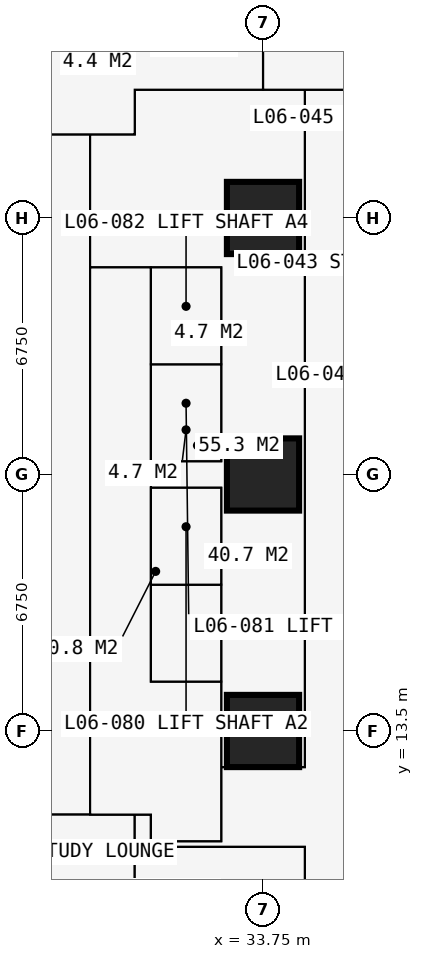
"""IFC4 building model, lengths in metres.
Left out: names, types, materials, properties, quantities, classifications, styles, units other than length and angle.
Written with IfcOpenShell. Run it as: python <this file> out.ifc"""

import sys

from ifc_helpers import new_model, si_unit, direction, frame, frame_2d, origin, origin_2d, place, context, subcontext, project, spatial, rectangle, extrude, element, fill, save


model = new_model("IFC4")
c1 = context("Model", 3, precision=1e-05, world=origin(), true_north=direction((0.0, 1.0)))
c2 = subcontext(c1, "Body", "Model", "MODEL_VIEW")
j1 = project(units=[si_unit("LENGTHUNIT", "METRE"), si_unit("PLANEANGLEUNIT", "RADIAN")], contexts=[c1])
p1 = place(None, origin())
s1 = spatial("IfcSite", under=j1, at=p1, CompositionType="ELEMENT")
p2 = place(p1, origin())
s2 = spatial("IfcBuilding", under=s1, at=p2, CompositionType="ELEMENT")
p3 = place(p2, frame((0.0, 0.0, 25.2)))
s3 = spatial("IfcBuildingStorey", under=s2, at=p3, CompositionType="ELEMENT", Elevation=25.2)
for number, where, z_axis, x_axis in (
    (1, (33.75, 13.5, 0.0), (0.0, 0.0, 1.0), (1.0, 0.0, 0.0)),
    (2, (33.75, 20.25, 0.0), (0.0, 0.0, 1.0), (1.0, 0.0, 0.0)),
    (3, (33.75, 27.0, 0.0), (0.0, 0.0, 1.0), (1.0, 0.0, 0.0)),
):
    element("IfcColumn", number, at=place(p3, frame(where, z_axis=z_axis, x_axis=x_axis)), inside=s3, PredefinedType="COLUMN", context=c2, shape_type="SweptSolid", body=[
        extrude(rectangle(XDim=1.9, YDim=1.9, at=origin_2d()), origin(), (0.0, 0.0, 1.0), 3.6),
    ])
p4 = place(p3, frame((10.125, 11.3, 0.0), z_axis=(0.0, 0.0, 1.0), x_axis=(1.0, 0.0, 0.0)))
e4 = element("IfcWall", 4, at=p4, inside=s3, PredefinedType="PARTITIONING", context=c2, shape_type="SweptSolid", body=[
    extrude(rectangle(XDim=20.675, YDim=0.15, at=frame_2d((10.337, 0.0))), origin(), (0.0, 0.0, 1.0), 3.375),
])
p5 = place(p4, frame((1.775, 0.0, 0.0)))
e5 = element("IfcOpeningElement", 5, at=p5, cuts=e4, PredefinedType="OPENING", context=c2, shape_type="SweptSolid", body=[
    extrude(rectangle(XDim=1.0, YDim=2.2, at=frame_2d((0.5, 1.1))), frame((0.0, 0.085, 0.0), z_axis=(0.0, -1.0, 0.0), x_axis=(1.0, 0.0, 0.0)), (0.0, 0.0, 1.0), 0.17),
])
p6 = place(p4, frame((11.312, 0.0, 0.0)))
e6 = element("IfcOpeningElement", 6, at=p6, cuts=e4, PredefinedType="OPENING", context=c2, shape_type="SweptSolid", body=[
    extrude(rectangle(XDim=1.0, YDim=2.2, at=frame_2d((0.5, 1.1))), frame((0.0, 0.085, 0.0), z_axis=(0.0, -1.0, 0.0), x_axis=(1.0, 0.0, 0.0)), (0.0, 0.0, 1.0), 0.17),
])
p7 = place(p3, frame((11.3, 29.2, 0.0), z_axis=(0.0, 0.0, 1.0), x_axis=(1.0, 0.0, 0.0)))
e7 = element("IfcWall", 7, at=p7, inside=s3, PredefinedType="PARTITIONING", context=c2, shape_type="SweptSolid", body=[
    extrude(rectangle(XDim=19.075, YDim=0.15, at=frame_2d((9.538, 0.0))), origin(), (0.0, 0.0, 1.0), 3.375),
])
p8 = place(p7, frame((12.875, 0.0, 0.0)))
e8 = element("IfcOpeningElement", 8, at=p8, cuts=e7, PredefinedType="OPENING", context=c2, shape_type="SweptSolid", body=[
    extrude(rectangle(XDim=1.0, YDim=2.2, at=frame_2d((0.5, 1.1))), frame((0.0, 0.085, 0.0), z_axis=(0.0, -1.0, 0.0), x_axis=(1.0, 0.0, 0.0)), (0.0, 0.0, 1.0), 0.17),
])
p9 = place(p7, frame((10.438, 0.0, 0.0)))
e9 = element("IfcOpeningElement", 9, at=p9, cuts=e7, PredefinedType="OPENING", context=c2, shape_type="SweptSolid", body=[
    extrude(rectangle(XDim=1.0, YDim=2.2, at=frame_2d((0.5, 1.1))), frame((0.0, 0.085, 0.0), z_axis=(0.0, -1.0, 0.0), x_axis=(1.0, 0.0, 0.0)), (0.0, 0.0, 1.0), 0.17),
])
p10 = place(p7, frame((15.675, 0.0, 0.0)))
e10 = element("IfcOpeningElement", 10, at=p10, cuts=e7, PredefinedType="OPENING", context=c2, shape_type="SweptSolid", body=[
    extrude(rectangle(XDim=0.95, YDim=2.2, at=frame_2d((0.475, 1.1))), frame((0.0, 0.085, 0.0), z_axis=(0.0, -1.0, 0.0), x_axis=(1.0, 0.0, 0.0)), (0.0, 0.0, 1.0), 0.17),
])
p11 = place(p3, frame((29.2, 11.3, 0.0), z_axis=(0.0, 0.0, 1.0), x_axis=(0.0, 1.0, 0.0)))
e11 = element("IfcWall", 11, at=p11, inside=s3, PredefinedType="PARTITIONING", context=c2, shape_type="SweptSolid", body=[
    extrude(rectangle(XDim=17.9, YDim=0.2, at=frame_2d((8.95, 0.0))), origin(), (0.0, 0.0, 1.0), 3.375),
])
p12 = place(p11, frame((8.35, 0.0, 0.0)))
e12 = element("IfcOpeningElement", 12, at=p12, cuts=e11, PredefinedType="OPENING", context=c2, shape_type="SweptSolid", body=[
    extrude(rectangle(XDim=1.2, YDim=2.2, at=frame_2d((0.6, 1.1))), frame((0.0, 0.11, 0.0), z_axis=(0.0, -1.0, 0.0), x_axis=(1.0, 0.0, 0.0)), (0.0, 0.0, 1.0), 0.22),
])
p13 = place(p3, frame((29.2, 25.7, 0.0), z_axis=(0.0, 0.0, 1.0), x_axis=(1.0, 0.0, 0.0)))
e13 = element("IfcWall", 13, at=p13, inside=s3, PredefinedType="SHEAR", context=c2, shape_type="SweptSolid", body=[
    extrude(rectangle(XDim=3.45, YDim=0.1, at=frame_2d((1.725, 0.0))), origin(), (0.0, 0.0, 1.0), 3.375),
])
p14 = place(p3, frame((30.375, -0.734, 0.0), z_axis=(0.0, 0.0, 1.0), x_axis=(0.0, 1.0, 0.0)))
e14 = element("IfcWall", 14, at=p14, inside=s3, PredefinedType="PARTITIONING", context=c2, shape_type="SweptSolid", body=[
    extrude(rectangle(XDim=12.034, YDim=0.15, at=frame_2d((6.017, 0.0))), origin(), (0.0, 0.0, 1.0), 3.375),
])
p15 = place(p14, frame((5.134, 0.0, 0.0)))
e15 = element("IfcOpeningElement", 15, at=p15, cuts=e14, PredefinedType="OPENING", context=c2, shape_type="SweptSolid", body=[
    extrude(rectangle(XDim=1.0, YDim=2.2, at=frame_2d((0.5, 1.1))), frame((0.0, 0.085, 0.0), z_axis=(0.0, -1.0, 0.0), x_axis=(1.0, 0.0, 0.0)), (0.0, 0.0, 1.0), 0.17),
])
p16 = place(p3, frame((30.375, 10.45, 0.0), z_axis=(0.0, 0.0, 1.0), x_axis=(1.0, 0.0, 0.0)))
e16 = element("IfcWall", 16, at=p16, inside=s3, PredefinedType="PARTITIONING", context=c2, shape_type="SweptSolid", body=[
    extrude(rectangle(XDim=4.475, YDim=0.15, at=frame_2d((2.238, 0.0))), origin(), (0.0, 0.0, 1.0), 3.375),
])
p17 = place(p16, frame((2.35, 0.0, 0.0)))
e17 = element("IfcOpeningElement", 17, at=p17, cuts=e16, PredefinedType="OPENING", context=c2, shape_type="SweptSolid", body=[
    extrude(rectangle(XDim=0.95, YDim=2.2, at=frame_2d((0.475, 1.1))), frame((0.0, 0.085, 0.0), z_axis=(0.0, -1.0, 0.0), x_axis=(1.0, 0.0, 0.0)), (0.0, 0.0, 1.0), 0.17),
])
p18 = place(p3, frame((30.375, 29.2, 0.0), z_axis=(0.0, 0.0, 1.0), x_axis=(0.0, 1.0, 0.0)))
e18 = element("IfcWall", 18, at=p18, inside=s3, PredefinedType="PARTITIONING", context=c2, shape_type="SweptSolid", body=[
    extrude(rectangle(XDim=1.175, YDim=0.15, at=frame_2d((0.587, 0.0))), origin(), (0.0, 0.0, 1.0), 3.375),
])
p19 = place(p3, frame((30.375, 30.375, 0.0), z_axis=(0.0, 0.0, 1.0), x_axis=(1.0, 0.0, 0.0)))
e19 = element("IfcWall", 19, at=p19, inside=s3, PredefinedType="PARTITIONING", context=c2, shape_type="SweptSolid", body=[
    extrude(rectangle(XDim=10.859, YDim=0.15, at=frame_2d((5.429, 0.0))), origin(), (0.0, 0.0, 1.0), 3.375),
])
p20 = place(p3, frame((30.8, 10.6, 0.0), z_axis=(0.0, 0.0, 1.0), x_axis=(0.0, 1.0, 0.0)))
e20 = element("IfcWall", 20, at=p20, inside=s3, PredefinedType="PARTITIONING", context=c2, shape_type="SweptSolid", body=[
    extrude(rectangle(XDim=0.7, YDim=0.15, at=frame_2d((0.35, 0.0))), origin(), (0.0, 0.0, 1.0), 3.375),
])
p21 = place(p3, frame((30.8, 10.6, 0.0), z_axis=(0.0, 0.0, 1.0), x_axis=(1.0, 0.0, 0.0)))
e21 = element("IfcWall", 21, at=p21, inside=s3, PredefinedType="PARTITIONING", context=c2, shape_type="SweptSolid", body=[
    extrude(rectangle(XDim=1.85, YDim=0.15, at=frame_2d((0.925, 0.0))), origin(), (0.0, 0.0, 1.0), 3.375),
])
p22 = place(p3, frame((30.8, 14.8, 0.0), z_axis=(0.0, 0.0, 1.0), x_axis=(0.0, 1.0, 0.0)))
e22 = element("IfcWall", 22, at=p22, inside=s3, PredefinedType="PARTITIONING", context=c2, shape_type="SweptSolid", body=[
    extrude(rectangle(XDim=10.9, YDim=0.15, at=frame_2d((5.45, 0.0))), origin(), (0.0, 0.0, 1.0), 3.375),
])
p23 = place(p22, frame((0.75, 0.0, 0.0)))
e23 = element("IfcOpeningElement", 23, at=p23, cuts=e22, PredefinedType="OPENING", context=c2, shape_type="SweptSolid", body=[
    extrude(rectangle(XDim=1.1, YDim=2.2, at=frame_2d((0.55, 1.1))), frame((0.0, 0.085, 0.0), z_axis=(0.0, -1.0, 0.0), x_axis=(1.0, 0.0, 0.0)), (0.0, 0.0, 1.0), 0.17),
])
p24 = place(p22, frame((3.25, 0.0, 0.0)))
e24 = element("IfcOpeningElement", 24, at=p24, cuts=e22, PredefinedType="OPENING", context=c2, shape_type="SweptSolid", body=[
    extrude(rectangle(XDim=1.1, YDim=2.2, at=frame_2d((0.55, 1.1))), frame((0.0, 0.085, 0.0), z_axis=(0.0, -1.0, 0.0), x_axis=(1.0, 0.0, 0.0)), (0.0, 0.0, 1.0), 0.17),
])
p25 = place(p22, frame((6.5, 0.0, 0.0)))
e25 = element("IfcOpeningElement", 25, at=p25, cuts=e22, PredefinedType="OPENING", context=c2, shape_type="SweptSolid", body=[
    extrude(rectangle(XDim=1.1, YDim=2.2, at=frame_2d((0.55, 1.1))), frame((0.0, 0.085, 0.0), z_axis=(0.0, -1.0, 0.0), x_axis=(1.0, 0.0, 0.0)), (0.0, 0.0, 1.0), 0.17),
])
p26 = place(p22, frame((9.05, 0.0, 0.0)))
e26 = element("IfcOpeningElement", 26, at=p26, cuts=e22, PredefinedType="OPENING", context=c2, shape_type="SweptSolid", body=[
    extrude(rectangle(XDim=1.1, YDim=2.2, at=frame_2d((0.55, 1.1))), frame((0.0, 0.085, 0.0), z_axis=(0.0, -1.0, 0.0), x_axis=(1.0, 0.0, 0.0)), (0.0, 0.0, 1.0), 0.17),
])
for number, where, z_axis, x_axis in (
    (27, (30.8, 14.8, 0.0), (0.0, 0.0, 1.0), (1.0, 0.0, 0.0)),
    (28, (30.8, 17.35, 0.0), (0.0, 0.0, 1.0), (1.0, 0.0, 0.0)),
    (29, (30.8, 19.9, 0.0), (0.0, 0.0, 1.0), (1.0, 0.0, 0.0)),
    (30, (30.8, 20.6, 0.0), (0.0, 0.0, 1.0), (1.0, 0.0, 0.0)),
    (31, (30.8, 23.15, 0.0), (0.0, 0.0, 1.0), (1.0, 0.0, 0.0)),
):
    element("IfcWall", number, at=place(p3, frame(where, z_axis=z_axis, x_axis=x_axis)), inside=s3, PredefinedType="SHEAR", context=c2, shape_type="SweptSolid", body=[
        extrude(rectangle(XDim=1.85, YDim=0.1, at=frame_2d((0.925, 0.0))), origin(), (0.0, 0.0, 1.0), 3.375),
    ])
p27 = place(p3, frame((32.65, 10.6, 0.0), z_axis=(0.0, 0.0, 1.0), x_axis=(0.0, 1.0, 0.0)))
e32 = element("IfcWall", 32, at=p27, inside=s3, PredefinedType="SHEAR", context=c2, shape_type="SweptSolid", body=[
    extrude(rectangle(XDim=9.3, YDim=0.1, at=frame_2d((4.65, 0.0))), origin(), (0.0, 0.0, 1.0), 3.375),
])
p28 = place(p27, frame((0.5, 0.0, 0.0)))
e33 = element("IfcOpeningElement", 33, at=p28, cuts=e32, PredefinedType="OPENING", context=c2, shape_type="SweptSolid", body=[
    extrude(rectangle(XDim=1.0, YDim=2.2, at=frame_2d((0.5, 1.1))), frame((0.0, 0.06, 0.0), z_axis=(0.0, -1.0, 0.0), x_axis=(1.0, 0.0, 0.0)), (0.0, 0.0, 1.0), 0.12),
])
p29 = place(p3, frame((32.65, 12.55, 0.0), z_axis=(0.0, 0.0, 1.0), x_axis=(1.0, 0.0, 0.0)))
e34 = element("IfcWall", 34, at=p29, inside=s3, PredefinedType="PARTITIONING", context=c2, shape_type="SweptSolid", body=[
    extrude(rectangle(XDim=2.2, YDim=0.15, at=frame_2d((1.1, 0.0))), origin(), (0.0, 0.0, 1.0), 3.375),
])
p30 = place(p3, frame((32.65, 20.6, 0.0), z_axis=(0.0, 0.0, 1.0), x_axis=(0.0, 1.0, 0.0)))
e35 = element("IfcWall", 35, at=p30, inside=s3, PredefinedType="PARTITIONING", context=c2, shape_type="SweptSolid", body=[
    extrude(rectangle(XDim=5.1, YDim=0.15, at=frame_2d((2.55, 0.0))), origin(), (0.0, 0.0, 1.0), 3.375),
])
p31 = place(p3, frame((33.75, 30.375, 0.0), z_axis=(0.0, 0.0, 1.0), x_axis=(0.0, 1.0, 0.0)))
e36 = element("IfcWall", 36, at=p31, inside=s3, PredefinedType="PARTITIONING", context=c2, shape_type="SweptSolid", body=[
    extrude(rectangle(XDim=5.975, YDim=0.15, at=frame_2d((2.988, 0.0))), origin(), (0.0, 0.0, 1.0), 2.877),
])
p32 = place(p3, frame((34.85, 6.75, 0.0), z_axis=(0.0, 0.0, 1.0), x_axis=(0.0, 1.0, 0.0)))
e37 = element("IfcWall", 37, at=p32, inside=s3, PredefinedType="PARTITIONING", context=c2, shape_type="SweptSolid", body=[
    extrude(rectangle(XDim=3.7, YDim=0.15, at=frame_2d((1.85, 0.0))), origin(), (0.0, 0.0, 1.0), 3.375),
])
p33 = place(p3, frame((34.85, 12.55, 0.0), z_axis=(0.0, 0.0, 1.0), x_axis=(0.0, 1.0, 0.0)))
e38 = element("IfcWall", 38, at=p33, inside=s3, PredefinedType="PARTITIONING", context=c2, shape_type="SweptSolid", body=[
    extrude(rectangle(XDim=17.825, YDim=0.15, at=frame_2d((8.913, 0.0))), origin(), (0.0, 0.0, 1.0), 3.375),
])
p34 = place(p33, frame((8.65, 0.0, 0.0)))
e39 = element("IfcOpeningElement", 39, at=p34, cuts=e38, PredefinedType="OPENING", context=c2, shape_type="SweptSolid", body=[
    extrude(rectangle(XDim=0.95, YDim=2.2, at=frame_2d((0.475, 1.1))), frame((0.0, 0.085, 0.0), z_axis=(0.0, -1.0, 0.0), x_axis=(1.0, 0.0, 0.0)), (0.0, 0.0, 1.0), 0.17),
])
p35 = place(p28, origin())
e40 = element("IfcDoor", 40, at=p35, inside=s3, OperationType="SINGLE_SWING_LEFT", PredefinedType="DOOR", context=c2, shape_type="SweptSolid", body=[
    extrude(rectangle(XDim=1.0, YDim=2.2, at=frame_2d((0.5, 1.1))), frame((0.0, 0.025, 0.0), z_axis=(0.0, -1.0, 0.0), x_axis=(1.0, 0.0, 0.0)), (0.0, 0.0, 1.0), 0.05),
])
fill(e33, e40)
p36 = place(p34, origin())
e41 = element("IfcDoor", 41, at=p36, inside=s3, OperationType="SINGLE_SWING_LEFT", PredefinedType="DOOR", context=c2, shape_type="SweptSolid", body=[
    extrude(rectangle(XDim=0.95, YDim=2.2, at=frame_2d((0.475, 1.1))), frame((0.0, 0.025, 0.0), z_axis=(0.0, -1.0, 0.0), x_axis=(1.0, 0.0, 0.0)), (0.0, 0.0, 1.0), 0.05),
])
fill(e39, e41)
p37 = place(p17, origin())
e42 = element("IfcDoor", 42, at=p37, inside=s3, OperationType="SINGLE_SWING_LEFT", PredefinedType="DOOR", context=c2, shape_type="SweptSolid", body=[
    extrude(rectangle(XDim=0.95, YDim=2.2, at=frame_2d((0.475, 1.1))), frame((0.0, 0.025, 0.0), z_axis=(0.0, -1.0, 0.0), x_axis=(1.0, 0.0, 0.0)), (0.0, 0.0, 1.0), 0.05),
])
fill(e17, e42)
p38 = place(p23, origin())
e43 = element("IfcDoor", 43, at=p38, inside=s3, OperationType="DOUBLE_DOOR_SLIDING", PredefinedType="DOOR", context=c2, shape_type="SweptSolid", body=[
    extrude(rectangle(XDim=1.1, YDim=2.2, at=frame_2d((0.55, 1.1))), frame((0.0, 0.025, 0.0), z_axis=(0.0, -1.0, 0.0), x_axis=(1.0, 0.0, 0.0)), (0.0, 0.0, 1.0), 0.05),
])
fill(e23, e43)
p39 = place(p24, origin())
e44 = element("IfcDoor", 44, at=p39, inside=s3, OperationType="DOUBLE_DOOR_SLIDING", PredefinedType="DOOR", context=c2, shape_type="SweptSolid", body=[
    extrude(rectangle(XDim=1.1, YDim=2.2, at=frame_2d((0.55, 1.1))), frame((0.0, 0.025, 0.0), z_axis=(0.0, -1.0, 0.0), x_axis=(1.0, 0.0, 0.0)), (0.0, 0.0, 1.0), 0.05),
])
fill(e24, e44)
p40 = place(p25, origin())
e45 = element("IfcDoor", 45, at=p40, inside=s3, OperationType="DOUBLE_DOOR_SLIDING", PredefinedType="DOOR", context=c2, shape_type="SweptSolid", body=[
    extrude(rectangle(XDim=1.1, YDim=2.2, at=frame_2d((0.55, 1.1))), frame((0.0, 0.025, 0.0), z_axis=(0.0, -1.0, 0.0), x_axis=(1.0, 0.0, 0.0)), (0.0, 0.0, 1.0), 0.05),
])
fill(e25, e45)
p41 = place(p26, origin())
e46 = element("IfcDoor", 46, at=p41, inside=s3, OperationType="DOUBLE_DOOR_SLIDING", PredefinedType="DOOR", context=c2, shape_type="SweptSolid", body=[
    extrude(rectangle(XDim=1.1, YDim=2.2, at=frame_2d((0.55, 1.1))), frame((0.0, 0.025, 0.0), z_axis=(0.0, -1.0, 0.0), x_axis=(1.0, 0.0, 0.0)), (0.0, 0.0, 1.0), 0.05),
])
fill(e26, e46)
p42 = place(p12, origin())
e47 = element("IfcDoor", 47, at=p42, inside=s3, OperationType="DOUBLE_DOOR_SINGLE_SWING", PredefinedType="DOOR", context=c2, shape_type="SweptSolid", body=[
    extrude(rectangle(XDim=1.2, YDim=2.2, at=frame_2d((0.6, 1.1))), frame((0.0, 0.025, 0.0), z_axis=(0.0, -1.0, 0.0), x_axis=(1.0, 0.0, 0.0)), (0.0, 0.0, 1.0), 0.05),
])
fill(e12, e47)
save(model, sys.argv[1])
